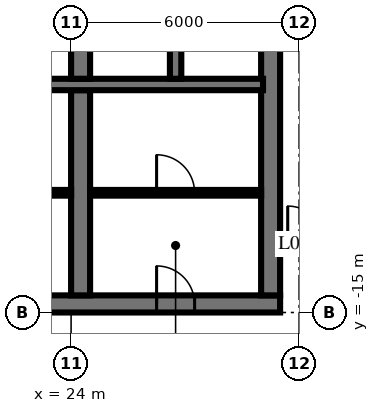
"""IFC4 building model, lengths in metres.
Left out: names, types, materials, properties, quantities, classifications, styles, units other than length and angle.
Written with IfcOpenShell. Run it as: python <this file> out.ifc"""

import sys

from ifc_helpers import new_model, si_unit, direction, frame, frame_2d, origin, place, context, subcontext, project, spatial, rectangle, extrude, element, fill, save


model = new_model("IFC4")
c1 = context("Model", 3, precision=1e-05, world=origin(), true_north=direction((0.0, 1.0)))
c2 = subcontext(c1, "Body", "Model", "MODEL_VIEW")
j1 = project(units=[si_unit("LENGTHUNIT", "METRE"), si_unit("PLANEANGLEUNIT", "RADIAN")], contexts=[c1])
p1 = place(None, origin())
s1 = spatial("IfcSite", under=j1, at=p1, CompositionType="ELEMENT")
p2 = place(p1, origin())
s2 = spatial("IfcBuilding", under=s1, at=p2, CompositionType="ELEMENT")
p3 = place(p2, frame((0.0, 0.0, 18.0)))
s3 = spatial("IfcBuildingStorey", under=s2, at=p3, CompositionType="ELEMENT", Elevation=18.0)
p4 = place(p3, frame((10.0, -14.775, 0.0), z_axis=(0.0, 0.0, 1.0), x_axis=(1.0, 0.0, 0.0)))
e1 = element("IfcWall", 1, at=p4, inside=s3, PredefinedType="SHEAR", context=c2, shape_type="SweptSolid", body=[
    extrude(rectangle(XDim=19.5, YDim=0.45, at=frame_2d((9.75, 0.0))), origin(), (0.0, 0.0, 1.0), 6.0),
])
p5 = place(p4, frame((6.5, 0.0, 0.0)))
e2 = element("IfcOpeningElement", 2, at=p5, cuts=e1, PredefinedType="OPENING", context=c2, shape_type="SweptSolid", body=[
    extrude(rectangle(XDim=1.2, YDim=2.1, at=frame_2d((0.6, 1.05))), frame((0.0, 0.235, 0.0), z_axis=(0.0, -1.0, 0.0), x_axis=(1.0, 0.0, 0.0)), (0.0, 0.0, 1.0), 0.47),
])
p6 = place(p4, frame((4.15, 0.0, 0.0)))
e3 = element("IfcOpeningElement", 3, at=p6, cuts=e1, PredefinedType="OPENING", context=c2, shape_type="SweptSolid", body=[
    extrude(rectangle(XDim=1.1, YDim=2.1, at=frame_2d((0.55, 1.05))), frame((0.0, 0.235, 0.0), z_axis=(0.0, -1.0, 0.0), x_axis=(1.0, 0.0, 0.0)), (0.0, 0.0, 1.0), 0.47),
])
p7 = place(p4, frame((10.1, 0.0, 0.0)))
e4 = element("IfcOpeningElement", 4, at=p7, cuts=e1, PredefinedType="OPENING", context=c2, shape_type="SweptSolid", body=[
    extrude(rectangle(XDim=0.9, YDim=2.1, at=frame_2d((0.45, 1.05))), frame((0.0, 0.235, 0.0), z_axis=(0.0, -1.0, 0.0), x_axis=(1.0, 0.0, 0.0)), (0.0, 0.0, 1.0), 0.47),
])
p8 = place(p4, frame((12.45, 0.0, 0.0)))
e5 = element("IfcOpeningElement", 5, at=p8, cuts=e1, PredefinedType="OPENING", context=c2, shape_type="SweptSolid", body=[
    extrude(rectangle(XDim=1.0, YDim=2.1, at=frame_2d((0.5, 1.05))), frame((0.0, 0.235, 0.0), z_axis=(0.0, -1.0, 0.0), x_axis=(1.0, 0.0, 0.0)), (0.0, 0.0, 1.0), 0.47),
])
p9 = place(p4, frame((16.25, 0.0, 0.0)))
e6 = element("IfcOpeningElement", 6, at=p9, cuts=e1, PredefinedType="OPENING", context=c2, shape_type="SweptSolid", body=[
    extrude(rectangle(XDim=1.0, YDim=2.1, at=frame_2d((0.5, 1.05))), frame((0.0, 0.235, 0.0), z_axis=(0.0, -1.0, 0.0), x_axis=(1.0, 0.0, 0.0)), (0.0, 0.0, 1.0), 0.47),
])
p10 = place(p3, frame((29.25, -14.55, 0.0), z_axis=(0.0, 0.0, 1.0), x_axis=(0.0, 1.0, 0.0)))
e7 = element("IfcWall", 7, at=p10, inside=s3, PredefinedType="SHEAR", context=c2, shape_type="SweptSolid", body=[
    extrude(rectangle(XDim=14.1, YDim=0.5, at=frame_2d((7.05, 0.0))), origin(), (0.0, 0.0, 1.0), 6.0),
])
p11 = place(p3, frame((10.35, -9.0, 0.0), z_axis=(0.0, 0.0, 1.0), x_axis=(1.0, 0.0, 0.0)))
e8 = element("IfcWall", 8, at=p11, inside=s3, PredefinedType="SHEAR", context=c2, shape_type="SweptSolid", body=[
    extrude(rectangle(XDim=18.7, YDim=0.3, at=frame_2d((9.35, 0.0))), origin(), (0.0, 0.0, 1.0), 6.0),
])
p12 = place(p11, frame((3.8, 0.0, 0.0)))
e9 = element("IfcOpeningElement", 9, at=p12, cuts=e8, PredefinedType="OPENING", context=c2, shape_type="SweptSolid", body=[
    extrude(rectangle(XDim=1.1, YDim=2.1, at=frame_2d((0.55, 1.05))), frame((0.0, 0.16, 0.0), z_axis=(0.0, -1.0, 0.0), x_axis=(1.0, 0.0, 0.0)), (0.0, 0.0, 1.0), 0.32),
])
p13 = place(p3, frame((24.25, -8.85, 0.0), z_axis=(0.0, 0.0, 1.0), x_axis=(0.0, 1.0, 0.0)))
e10 = element("IfcWall", 10, at=p13, inside=s3, PredefinedType="SHEAR", context=c2, shape_type="SweptSolid", body=[
    extrude(rectangle(XDim=2.3, YDim=0.5, at=frame_2d((1.15, 0.0))), origin(), (0.0, 0.0, 1.0), 6.0),
])
p14 = place(p3, frame((24.25, -14.55, 0.0), z_axis=(0.0, 0.0, 1.0), x_axis=(0.0, 1.0, 0.0)))
e11 = element("IfcWall", 11, at=p14, inside=s3, PredefinedType="SHEAR", context=c2, shape_type="SweptSolid", body=[
    extrude(rectangle(XDim=5.4, YDim=0.5, at=frame_2d((2.7, 0.0))), origin(), (0.0, 0.0, 1.0), 6.0),
])
p15 = place(p3, frame((26.75, -8.85, 0.0), z_axis=(0.0, 0.0, 1.0), x_axis=(0.0, 1.0, 0.0)))
e12 = element("IfcWall", 12, at=p15, inside=s3, PredefinedType="SHEAR", context=c2, shape_type="SweptSolid", body=[
    extrude(rectangle(XDim=2.3, YDim=0.3, at=frame_2d((1.15, 0.0))), origin(), (0.0, 0.0, 1.0), 6.0),
])
p16 = place(p3, frame((21.9, -11.85, 0.0), z_axis=(0.0, 0.0, 1.0), x_axis=(1.0, 0.0, 0.0)))
e13 = element("IfcWall", 13, at=p16, inside=s3, PredefinedType="PARTITIONING", context=c2, shape_type="SweptSolid", body=[
    extrude(rectangle(XDim=2.1, YDim=0.15, at=frame_2d((1.05, 0.0))), origin(), (0.0, 0.0, 1.0), 5.7),
])
p17 = place(p16, frame((0.55, 0.0, 0.0)))
e14 = element("IfcOpeningElement", 14, at=p17, cuts=e13, PredefinedType="OPENING", context=c2, shape_type="SweptSolid", body=[
    extrude(rectangle(XDim=1.0, YDim=2.1, at=frame_2d((0.5, 1.05))), frame((0.0, 0.085, 0.0), z_axis=(0.0, -1.0, 0.0), x_axis=(1.0, 0.0, 0.0)), (0.0, 0.0, 1.0), 0.17),
])
p18 = place(p3, frame((24.5, -11.85, 0.0), z_axis=(0.0, 0.0, 1.0), x_axis=(1.0, 0.0, 0.0)))
e15 = element("IfcWall", 15, at=p18, inside=s3, PredefinedType="PARTITIONING", context=c2, shape_type="SweptSolid", body=[
    extrude(rectangle(XDim=4.5, YDim=0.15, at=frame_2d((2.25, 0.0))), origin(), (0.0, 0.0, 1.0), 5.7),
])
p19 = place(p18, frame((1.75, 0.0, 0.0)))
e16 = element("IfcOpeningElement", 16, at=p19, cuts=e15, PredefinedType="OPENING", context=c2, shape_type="SweptSolid", body=[
    extrude(rectangle(XDim=1.0, YDim=2.1, at=frame_2d((0.5, 1.05))), frame((0.0, 0.085, 0.0), z_axis=(0.0, -1.0, 0.0), x_axis=(1.0, 0.0, 0.0)), (0.0, 0.0, 1.0), 0.17),
])
p20 = place(p3, frame((29.55, -13.2, 0.0), z_axis=(0.0, 0.0, 1.0), x_axis=(1.0, 0.0, 0.0)))
e17 = element("IfcWall", 17, at=p20, inside=s3, PredefinedType="PARTITIONING", context=c2, shape_type="SweptSolid", body=[
    extrude(rectangle(XDim=2.934, YDim=0.15, at=frame_2d((1.467, 0.0))), origin(), (0.0, 0.0, 1.0), 5.55),
])
p21 = place(p20, frame((0.15, 0.0, 0.0)))
e18 = element("IfcOpeningElement", 18, at=p21, cuts=e17, PredefinedType="OPENING", context=c2, shape_type="SweptSolid", body=[
    extrude(rectangle(XDim=1.0, YDim=2.1, at=frame_2d((0.5, 1.05))), frame((0.0, 0.085, 0.0), z_axis=(0.0, -1.0, 0.0), x_axis=(1.0, 0.0, 0.0)), (0.0, 0.0, 1.0), 0.17),
])
p22 = place(p9, origin())
e19 = element("IfcDoor", 19, at=p22, inside=s3, OperationType="SINGLE_SWING_RIGHT", PredefinedType="DOOR", context=c2, shape_type="SweptSolid", body=[
    extrude(rectangle(XDim=1.0, YDim=2.1, at=frame_2d((0.5, 1.05))), frame((0.0, 0.025, 0.0), z_axis=(0.0, -1.0, 0.0), x_axis=(1.0, 0.0, 0.0)), (0.0, 0.0, 1.0), 0.05),
])
fill(e6, e19)
p23 = place(p19, origin())
e20 = element("IfcDoor", 20, at=p23, inside=s3, OperationType="SINGLE_SWING_RIGHT", PredefinedType="DOOR", context=c2, shape_type="SweptSolid", body=[
    extrude(rectangle(XDim=1.0, YDim=2.1, at=frame_2d((0.5, 1.05))), frame((0.0, 0.025, 0.0), z_axis=(0.0, -1.0, 0.0), x_axis=(1.0, 0.0, 0.0)), (0.0, 0.0, 1.0), 0.05),
])
fill(e16, e20)
p24 = place(p21, origin())
e21 = element("IfcDoor", 21, at=p24, inside=s3, OperationType="SINGLE_SWING_RIGHT", PredefinedType="DOOR", context=c2, shape_type="SweptSolid", body=[
    extrude(rectangle(XDim=1.0, YDim=2.1, at=frame_2d((0.5, 1.05))), frame((0.0, 0.025, 0.0), z_axis=(0.0, -1.0, 0.0), x_axis=(1.0, 0.0, 0.0)), (0.0, 0.0, 1.0), 0.05),
])
fill(e18, e21)
save(model, sys.argv[1])
